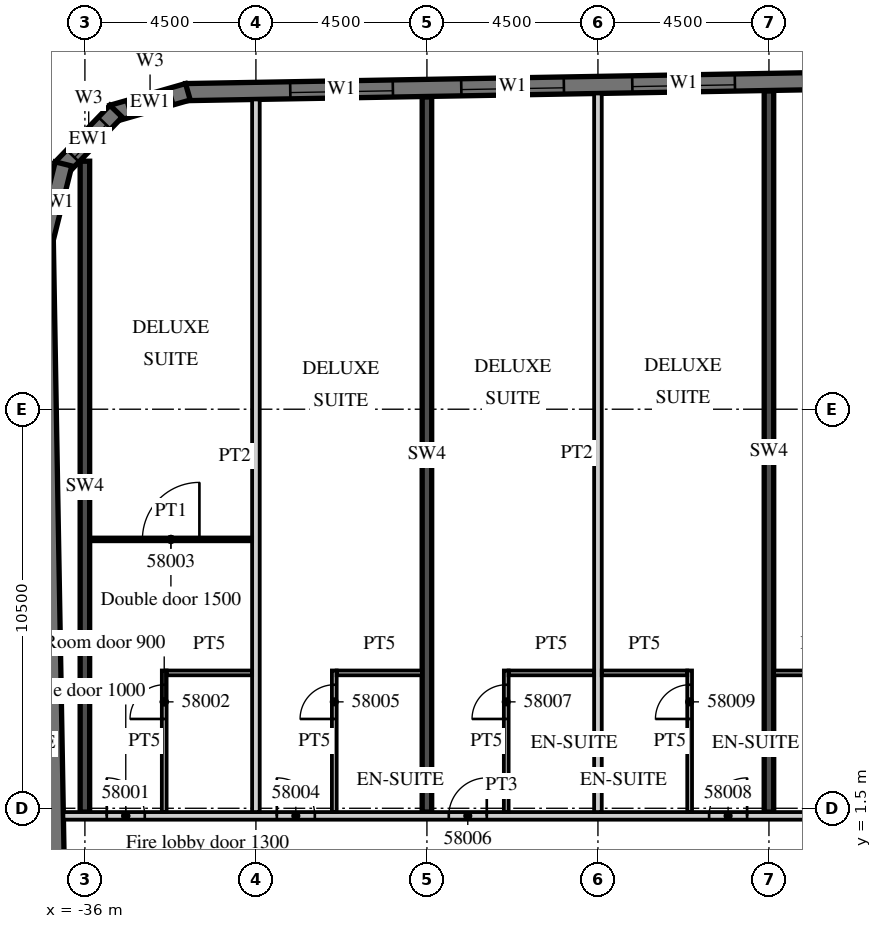
"""IFC4 building model, lengths in metres.
Left out: names, types, materials, properties, quantities, classifications, styles, units other than length and angle.
Written with IfcOpenShell. Run it as: python <this file> out.ifc"""

import sys

from ifc_helpers import new_model, si_unit, direction, frame, frame_2d, origin, place, context, subcontext, project, spatial, polyline, rectangle, outline, extrude, element, fill, save


model = new_model("IFC4")
c1 = context("Model", 3, precision=1e-05, world=origin(), true_north=direction((0.0, 1.0)))
c2 = subcontext(c1, "Body", "Model", "MODEL_VIEW")
j1 = project(units=[si_unit("LENGTHUNIT", "METRE"), si_unit("PLANEANGLEUNIT", "RADIAN")], contexts=[c1])
p1 = place(None, origin())
s1 = spatial("IfcSite", under=j1, at=p1, CompositionType="ELEMENT")
p2 = place(p1, origin())
s2 = spatial("IfcBuilding", under=s1, at=p2, CompositionType="ELEMENT")
p3 = place(p2, frame((0.0, 0.0, 237.5)))
s3 = spatial("IfcBuildingStorey", under=s2, at=p3, CompositionType="ELEMENT", Elevation=237.5)
p4 = place(p3, frame((-36.0, 1.4, 0.0), z_axis=(0.0, 0.0, 1.0), x_axis=(0.0, 1.0, 0.0)))
e1 = element("IfcWall", 1, at=p4, inside=s3, PredefinedType="SHEAR", context=c2, shape_type="SweptSolid", body=[
    extrude(rectangle(XDim=17.125, YDim=0.25, at=frame_2d((8.563, 0.0))), origin(), (0.0, 0.0, 1.0), 3.3),
])
p5 = place(p3, frame((-27.0, 1.4, 0.0), z_axis=(0.0, 0.0, 1.0), x_axis=(0.0, 1.0, 0.0)))
e2 = element("IfcWall", 2, at=p5, inside=s3, PredefinedType="SHEAR", context=c2, shape_type="SweptSolid", body=[
    extrude(rectangle(XDim=18.817, YDim=0.25, at=frame_2d((9.409, 0.0))), origin(), (0.0, 0.0, 1.0), 3.3),
])
p6 = place(p3, frame((-18.0, 1.4, 0.0), z_axis=(0.0, 0.0, 1.0), x_axis=(0.0, 1.0, 0.0)))
e3 = element("IfcWall", 3, at=p6, inside=s3, PredefinedType="SHEAR", context=c2, shape_type="SweptSolid", body=[
    extrude(rectangle(XDim=18.974, YDim=0.25, at=frame_2d((9.487, 0.0))), origin(), (0.0, 0.0, 1.0), 3.3),
])
p7 = place(p3, frame((-37.057, 16.503, 0.0), z_axis=(0.0, 0.0, 1.0), x_axis=(0.017452279857, -0.999847697366, 0.0)))
e4 = element("IfcWall", 4, at=p7, inside=s3, PredefinedType="SOLIDWALL", context=c2, shape_type="SweptSolid", body=[
    extrude(rectangle(XDim=33.0, YDim=0.45, at=frame_2d((16.5, 0.0))), origin(), (0.0, 0.0, 1.0), 3.02),
])
p8 = place(p3, frame((13.504, 21.161, 0.0), z_axis=(0.0, 0.0, 1.0), x_axis=(-0.999847763257, -0.017448504532, 0.0)))
e5 = element("IfcWall", 5, at=p8, inside=s3, PredefinedType="SOLIDWALL", context=c2, shape_type="SweptSolid", body=[
    extrude(rectangle(XDim=46.859, YDim=0.45, at=frame_2d((23.43, 0.0))), origin(), (0.0, 0.0, 1.0), 3.02),
])
p9 = place(p8, frame((0.9, 0.0, 0.45)))
e6 = element("IfcOpeningElement", 6, at=p9, cuts=e5, PredefinedType="OPENING", context=c2, shape_type="SweptSolid", body=[
    extrude(rectangle(XDim=2.7, YDim=2.25, at=frame_2d((1.35, 1.125))), frame((0.0, 0.235, 0.0), z_axis=(0.0, -1.0, 0.0), x_axis=(1.0, 0.0, 0.0)), (0.0, 0.0, 1.0), 0.47),
])
p10 = place(p8, frame((5.401, 0.0, 0.45)))
e7 = element("IfcOpeningElement", 7, at=p10, cuts=e5, PredefinedType="OPENING", context=c2, shape_type="SweptSolid", body=[
    extrude(rectangle(XDim=2.7, YDim=2.25, at=frame_2d((1.35, 1.125))), frame((0.0, 0.235, 0.0), z_axis=(0.0, -1.0, 0.0), x_axis=(1.0, 0.0, 0.0)), (0.0, 0.0, 1.0), 0.47),
])
p11 = place(p8, frame((9.902, 0.0, 0.45)))
e8 = element("IfcOpeningElement", 8, at=p11, cuts=e5, PredefinedType="OPENING", context=c2, shape_type="SweptSolid", body=[
    extrude(rectangle(XDim=2.7, YDim=2.25, at=frame_2d((1.35, 1.125))), frame((0.0, 0.235, 0.0), z_axis=(0.0, -1.0, 0.0), x_axis=(1.0, 0.0, 0.0)), (0.0, 0.0, 1.0), 0.47),
])
p12 = place(p8, frame((14.402, 0.0, 0.45)))
e9 = element("IfcOpeningElement", 9, at=p12, cuts=e5, PredefinedType="OPENING", context=c2, shape_type="SweptSolid", body=[
    extrude(rectangle(XDim=2.7, YDim=2.25, at=frame_2d((1.35, 1.125))), frame((0.0, 0.235, 0.0), z_axis=(0.0, -1.0, 0.0), x_axis=(1.0, 0.0, 0.0)), (0.0, 0.0, 1.0), 0.47),
])
p13 = place(p8, frame((18.903, 0.0, 0.45)))
e10 = element("IfcOpeningElement", 10, at=p13, cuts=e5, PredefinedType="OPENING", context=c2, shape_type="SweptSolid", body=[
    extrude(rectangle(XDim=2.7, YDim=2.25, at=frame_2d((1.35, 1.125))), frame((0.0, 0.235, 0.0), z_axis=(0.0, -1.0, 0.0), x_axis=(1.0, 0.0, 0.0)), (0.0, 0.0, 1.0), 0.47),
])
p14 = place(p8, frame((23.404, 0.0, 0.45)))
e11 = element("IfcOpeningElement", 11, at=p14, cuts=e5, PredefinedType="OPENING", context=c2, shape_type="SweptSolid", body=[
    extrude(rectangle(XDim=2.7, YDim=2.25, at=frame_2d((1.35, 1.125))), frame((0.0, 0.235, 0.0), z_axis=(0.0, -1.0, 0.0), x_axis=(1.0, 0.0, 0.0)), (0.0, 0.0, 1.0), 0.47),
])
p15 = place(p8, frame((27.904, 0.0, 0.45)))
e12 = element("IfcOpeningElement", 12, at=p15, cuts=e5, PredefinedType="OPENING", context=c2, shape_type="SweptSolid", body=[
    extrude(rectangle(XDim=2.7, YDim=2.25, at=frame_2d((1.35, 1.125))), frame((0.0, 0.235, 0.0), z_axis=(0.0, -1.0, 0.0), x_axis=(1.0, 0.0, 0.0)), (0.0, 0.0, 1.0), 0.47),
])
p16 = place(p8, frame((32.405, 0.0, 0.45)))
e13 = element("IfcOpeningElement", 13, at=p16, cuts=e5, PredefinedType="OPENING", context=c2, shape_type="SweptSolid", body=[
    extrude(rectangle(XDim=2.7, YDim=2.25, at=frame_2d((1.35, 1.125))), frame((0.0, 0.235, 0.0), z_axis=(0.0, -1.0, 0.0), x_axis=(1.0, 0.0, 0.0)), (0.0, 0.0, 1.0), 0.47),
])
p17 = place(p8, frame((36.906, 0.0, 0.45)))
e14 = element("IfcOpeningElement", 14, at=p17, cuts=e5, PredefinedType="OPENING", context=c2, shape_type="SweptSolid", body=[
    extrude(rectangle(XDim=2.7, YDim=2.25, at=frame_2d((1.35, 1.125))), frame((0.0, 0.235, 0.0), z_axis=(0.0, -1.0, 0.0), x_axis=(1.0, 0.0, 0.0)), (0.0, 0.0, 1.0), 0.47),
])
p18 = place(p8, frame((41.406, 0.0, 0.45)))
e15 = element("IfcOpeningElement", 15, at=p18, cuts=e5, PredefinedType="OPENING", context=c2, shape_type="SweptSolid", body=[
    extrude(rectangle(XDim=2.7, YDim=2.25, at=frame_2d((1.35, 1.125))), frame((0.0, 0.235, 0.0), z_axis=(0.0, -1.0, 0.0), x_axis=(1.0, 0.0, 0.0)), (0.0, 0.0, 1.0), 0.47),
])
p19 = place(p3, frame((-33.29, 20.352, 0.0), z_axis=(0.0, 0.0, 1.0), x_axis=(-0.961247584925, -0.275686562016, 0.0)))
e16 = element("IfcWall", 16, at=p19, inside=s3, PredefinedType="SOLIDWALL", context=c2, shape_type="SweptSolid", body=[
    extrude(outline(polyline([(0.0, -0.225), (2.071, -0.225), (1.95, 0.225), (0.121, 0.225), (0.0, -0.225)])), origin(), (0.0, 0.0, 1.0), 3.02),
])
p20 = place(p19, frame((0.435, 0.0, 0.45)))
e17 = element("IfcOpeningElement", 17, at=p20, cuts=e16, PredefinedType="OPENING", context=c2, shape_type="SweptSolid", body=[
    extrude(rectangle(XDim=1.2, YDim=2.25, at=frame_2d((0.6, 1.125))), frame((0.0, 0.235, 0.0), z_axis=(0.0, -1.0, 0.0), x_axis=(1.0, 0.0, 0.0)), (0.0, 0.0, 1.0), 0.47),
])
p21 = place(p3, frame((-35.181, 19.842, 0.0), z_axis=(0.0, 0.0, 1.0), x_axis=(-0.694678672846, -0.719320193998, 0.0)))
e18 = element("IfcWall", 18, at=p21, inside=s3, PredefinedType="SOLIDWALL", context=c2, shape_type="SweptSolid", body=[
    extrude(outline(polyline([(0.0, -0.225), (2.071, -0.225), (1.95, 0.225), (0.121, 0.225), (0.0, -0.225)])), origin(), (0.0, 0.0, 1.0), 3.02),
])
p22 = place(p21, frame((0.435, 0.0, 0.45)))
e19 = element("IfcOpeningElement", 19, at=p22, cuts=e18, PredefinedType="OPENING", context=c2, shape_type="SweptSolid", body=[
    extrude(rectangle(XDim=1.2, YDim=2.25, at=frame_2d((0.6, 1.125))), frame((0.0, 0.235, 0.0), z_axis=(0.0, -1.0, 0.0), x_axis=(1.0, 0.0, 0.0)), (0.0, 0.0, 1.0), 0.47),
])
p23 = place(p3, frame((-36.563, 18.454, 0.0), z_axis=(0.0, 0.0, 1.0), x_axis=(-0.241869623482, -0.970308757683, 0.0)))
e20 = element("IfcWall", 20, at=p23, inside=s3, PredefinedType="SOLIDWALL", context=c2, shape_type="SweptSolid", body=[
    extrude(outline(polyline([(-0.0, -0.225), (2.07, -0.225), (1.95, 0.225), (0.12, 0.225), (-0.0, -0.225)])), origin(), (0.0, 0.0, 1.0), 3.02),
])
p24 = place(p3, frame((-36.566, 1.3, 0.0), z_axis=(0.0, 0.0, 1.0), x_axis=(1.0, 0.0, 0.0)))
e21 = element("IfcWall", 21, at=p24, inside=s3, PredefinedType="PARTITIONING", context=c2, shape_type="SweptSolid", body=[
    extrude(rectangle(XDim=23.066, YDim=0.2, at=frame_2d((11.533, 0.0))), origin(), (0.0, 0.0, 1.0), 3.02),
])
p25 = place(p24, frame((1.141, 0.0, 0.0)))
e22 = element("IfcOpeningElement", 22, at=p25, cuts=e21, PredefinedType="OPENING", context=c2, shape_type="SweptSolid", body=[
    extrude(rectangle(XDim=1.0, YDim=2.1, at=frame_2d((0.5, 1.05))), frame((0.0, 0.11, 0.0), z_axis=(0.0, -1.0, 0.0), x_axis=(1.0, 0.0, 0.0)), (0.0, 0.0, 1.0), 0.22),
])
p26 = place(p24, frame((5.616, 0.0, 0.0)))
e23 = element("IfcOpeningElement", 23, at=p26, cuts=e21, PredefinedType="OPENING", context=c2, shape_type="SweptSolid", body=[
    extrude(rectangle(XDim=1.0, YDim=2.1, at=frame_2d((0.5, 1.05))), frame((0.0, 0.11, 0.0), z_axis=(0.0, -1.0, 0.0), x_axis=(1.0, 0.0, 0.0)), (0.0, 0.0, 1.0), 0.22),
])
p27 = place(p24, frame((10.141, 0.0, 0.0)))
e24 = element("IfcOpeningElement", 24, at=p27, cuts=e21, PredefinedType="OPENING", context=c2, shape_type="SweptSolid", body=[
    extrude(rectangle(XDim=1.0, YDim=2.1, at=frame_2d((0.5, 1.05))), frame((0.0, 0.11, 0.0), z_axis=(0.0, -1.0, 0.0), x_axis=(1.0, 0.0, 0.0)), (0.0, 0.0, 1.0), 0.22),
])
p28 = place(p24, frame((16.991, 0.0, 0.0)))
e25 = element("IfcOpeningElement", 25, at=p28, cuts=e21, PredefinedType="OPENING", context=c2, shape_type="SweptSolid", body=[
    extrude(rectangle(XDim=1.0, YDim=2.1, at=frame_2d((0.5, 1.05))), frame((0.0, 0.11, 0.0), z_axis=(0.0, -1.0, 0.0), x_axis=(1.0, 0.0, 0.0)), (0.0, 0.0, 1.0), 0.22),
])
p29 = place(p24, frame((21.491, 0.0, 0.0)))
e26 = element("IfcOpeningElement", 26, at=p29, cuts=e21, PredefinedType="OPENING", context=c2, shape_type="SweptSolid", body=[
    extrude(rectangle(XDim=1.0, YDim=2.1, at=frame_2d((0.5, 1.05))), frame((0.0, 0.11, 0.0), z_axis=(0.0, -1.0, 0.0), x_axis=(1.0, 0.0, 0.0)), (0.0, 0.0, 1.0), 0.22),
])
p30 = place(p3, frame((-31.5, 1.4, 0.0), z_axis=(0.0, 0.0, 1.0), x_axis=(0.0, 1.0, 0.0)))
e27 = element("IfcWall", 27, at=p30, inside=s3, PredefinedType="PARTITIONING", context=c2, shape_type="SweptSolid", body=[
    extrude(rectangle(XDim=18.751, YDim=0.2, at=frame_2d((9.375, 0.0))), origin(), (0.0, 0.0, 1.0), 3.02),
])
p31 = place(p3, frame((-33.913, 1.4, 0.0), z_axis=(0.0, 0.0, 1.0), x_axis=(0.0, 1.0, 0.0)))
e28 = element("IfcWall", 28, at=p31, inside=s3, PredefinedType="PARTITIONING", context=c2, shape_type="SweptSolid", body=[
    extrude(rectangle(XDim=3.725, YDim=0.125, at=frame_2d((1.863, 0.0))), origin(), (0.0, 0.0, 1.0), 3.02),
])
p32 = place(p31, frame((2.45, 0.0, 0.0)))
e29 = element("IfcOpeningElement", 29, at=p32, cuts=e28, PredefinedType="OPENING", context=c2, shape_type="SweptSolid", body=[
    extrude(rectangle(XDim=0.9, YDim=2.1, at=frame_2d((0.45, 1.05))), frame((0.0, 0.073, 0.0), z_axis=(0.0, -1.0, 0.0), x_axis=(1.0, 0.0, 0.0)), (0.0, 0.0, 1.0), 0.145),
])
p33 = place(p3, frame((-33.85, 5.062, 0.0), z_axis=(0.0, 0.0, 1.0), x_axis=(1.0, 0.0, 0.0)))
e30 = element("IfcWall", 30, at=p33, inside=s3, PredefinedType="PARTITIONING", context=c2, shape_type="SweptSolid", body=[
    extrude(rectangle(XDim=2.25, YDim=0.125, at=frame_2d((1.125, 0.0))), origin(), (0.0, 0.0, 1.0), 3.02),
])
p34 = place(p3, frame((-35.875, 8.575, 0.0), z_axis=(0.0, 0.0, 1.0), x_axis=(1.0, 0.0, 0.0)))
e31 = element("IfcWall", 31, at=p34, inside=s3, PredefinedType="PARTITIONING", context=c2, shape_type="SweptSolid", body=[
    extrude(rectangle(XDim=4.275, YDim=0.1, at=frame_2d((2.137, 0.0))), origin(), (0.0, 0.0, 1.0), 3.02),
])
p35 = place(p34, frame((1.388, 0.0, 0.0)))
e32 = element("IfcOpeningElement", 32, at=p35, cuts=e31, PredefinedType="OPENING", context=c2, shape_type="SweptSolid", body=[
    extrude(rectangle(XDim=1.5, YDim=2.1, at=frame_2d((0.75, 1.05))), frame((0.0, 0.06, 0.0), z_axis=(0.0, -1.0, 0.0), x_axis=(1.0, 0.0, 0.0)), (0.0, 0.0, 1.0), 0.12),
])
p36 = place(p3, frame((-29.438, 1.4, 0.0), z_axis=(0.0, 0.0, 1.0), x_axis=(0.0, 1.0, 0.0)))
e33 = element("IfcWall", 33, at=p36, inside=s3, PredefinedType="PARTITIONING", context=c2, shape_type="SweptSolid", body=[
    extrude(rectangle(XDim=3.725, YDim=0.125, at=frame_2d((1.863, 0.0))), origin(), (0.0, 0.0, 1.0), 3.02),
])
p37 = place(p36, frame((2.45, 0.0, 0.0)))
e34 = element("IfcOpeningElement", 34, at=p37, cuts=e33, PredefinedType="OPENING", context=c2, shape_type="SweptSolid", body=[
    extrude(rectangle(XDim=0.9, YDim=2.1, at=frame_2d((0.45, 1.05))), frame((0.0, 0.073, 0.0), z_axis=(0.0, -1.0, 0.0), x_axis=(1.0, 0.0, 0.0)), (0.0, 0.0, 1.0), 0.145),
])
p38 = place(p3, frame((-29.375, 5.062, 0.0), z_axis=(0.0, 0.0, 1.0), x_axis=(1.0, 0.0, 0.0)))
e35 = element("IfcWall", 35, at=p38, inside=s3, PredefinedType="PARTITIONING", context=c2, shape_type="SweptSolid", body=[
    extrude(rectangle(XDim=2.25, YDim=0.125, at=frame_2d((1.125, 0.0))), origin(), (0.0, 0.0, 1.0), 3.02),
])
p39 = place(p3, frame((-22.5, 1.4, 0.0), z_axis=(0.0, 0.0, 1.0), x_axis=(0.0, 1.0, 0.0)))
e36 = element("IfcWall", 36, at=p39, inside=s3, PredefinedType="PARTITIONING", context=c2, shape_type="SweptSolid", body=[
    extrude(rectangle(XDim=18.908, YDim=0.2, at=frame_2d((9.454, 0.0))), origin(), (0.0, 0.0, 1.0), 3.02),
])
p40 = place(p3, frame((-24.913, 1.4, 0.0), z_axis=(0.0, 0.0, 1.0), x_axis=(0.0, 1.0, 0.0)))
e37 = element("IfcWall", 37, at=p40, inside=s3, PredefinedType="PARTITIONING", context=c2, shape_type="SweptSolid", body=[
    extrude(rectangle(XDim=3.725, YDim=0.125, at=frame_2d((1.863, 0.0))), origin(), (0.0, 0.0, 1.0), 3.02),
])
p41 = place(p40, frame((2.45, 0.0, 0.0)))
e38 = element("IfcOpeningElement", 38, at=p41, cuts=e37, PredefinedType="OPENING", context=c2, shape_type="SweptSolid", body=[
    extrude(rectangle(XDim=0.9, YDim=2.1, at=frame_2d((0.45, 1.05))), frame((0.0, 0.073, 0.0), z_axis=(0.0, -1.0, 0.0), x_axis=(1.0, 0.0, 0.0)), (0.0, 0.0, 1.0), 0.145),
])
p42 = place(p3, frame((-24.85, 5.062, 0.0), z_axis=(0.0, 0.0, 1.0), x_axis=(1.0, 0.0, 0.0)))
e39 = element("IfcWall", 39, at=p42, inside=s3, PredefinedType="PARTITIONING", context=c2, shape_type="SweptSolid", body=[
    extrude(rectangle(XDim=2.25, YDim=0.125, at=frame_2d((1.125, 0.0))), origin(), (0.0, 0.0, 1.0), 3.02),
])
p43 = place(p3, frame((-20.087, 1.4, 0.0), z_axis=(0.0, 0.0, 1.0), x_axis=(0.0, 1.0, 0.0)))
e40 = element("IfcWall", 40, at=p43, inside=s3, PredefinedType="PARTITIONING", context=c2, shape_type="SweptSolid", body=[
    extrude(rectangle(XDim=3.725, YDim=0.125, at=frame_2d((1.863, 0.0))), origin(), (0.0, 0.0, 1.0), 3.02),
])
p44 = place(p43, frame((2.45, 0.0, 0.0)))
e41 = element("IfcOpeningElement", 41, at=p44, cuts=e40, PredefinedType="OPENING", context=c2, shape_type="SweptSolid", body=[
    extrude(rectangle(XDim=0.9, YDim=2.1, at=frame_2d((0.45, 1.05))), frame((0.0, 0.073, 0.0), z_axis=(0.0, -1.0, 0.0), x_axis=(1.0, 0.0, 0.0)), (0.0, 0.0, 1.0), 0.145),
])
for number, where, z_axis, x_axis in (
    (42, (-22.4, 5.062, 0.0), (0.0, 0.0, 1.0), (1.0, 0.0, 0.0)),
    (43, (-17.875, 5.062, 0.0), (0.0, 0.0, 1.0), (1.0, 0.0, 0.0)),
):
    element("IfcWall", number, at=place(p3, frame(where, z_axis=z_axis, x_axis=x_axis)), inside=s3, PredefinedType="PARTITIONING", context=c2, shape_type="SweptSolid", body=[
        extrude(rectangle(XDim=2.25, YDim=0.125, at=frame_2d((1.125, 0.0))), origin(), (0.0, 0.0, 1.0), 3.02),
    ])
p45 = place(p16, origin())
e44 = element("IfcWindow", 44, at=p45, inside=s3, PartitioningType="SINGLE_PANEL", PredefinedType="WINDOW", context=c2, shape_type="SweptSolid", body=[
    extrude(rectangle(XDim=2.7, YDim=2.25, at=frame_2d((1.35, 1.125))), frame((0.0, 0.09, 0.0), z_axis=(0.0, -1.0, 0.0), x_axis=(1.0, 0.0, 0.0)), (0.0, 0.0, 1.0), 0.06),
])
fill(e13, e44)
p46 = place(p17, origin())
e45 = element("IfcWindow", 45, at=p46, inside=s3, PartitioningType="SINGLE_PANEL", PredefinedType="WINDOW", context=c2, shape_type="SweptSolid", body=[
    extrude(rectangle(XDim=2.7, YDim=2.25, at=frame_2d((1.35, 1.125))), frame((0.0, 0.09, 0.0), z_axis=(0.0, -1.0, 0.0), x_axis=(1.0, 0.0, 0.0)), (0.0, 0.0, 1.0), 0.06),
])
fill(e14, e45)
p47 = place(p18, origin())
e46 = element("IfcWindow", 46, at=p47, inside=s3, PartitioningType="SINGLE_PANEL", PredefinedType="WINDOW", context=c2, shape_type="SweptSolid", body=[
    extrude(rectangle(XDim=2.7, YDim=2.25, at=frame_2d((1.35, 1.125))), frame((0.0, 0.09, 0.0), z_axis=(0.0, -1.0, 0.0), x_axis=(1.0, 0.0, 0.0)), (0.0, 0.0, 1.0), 0.06),
])
fill(e15, e46)
p48 = place(p20, origin())
e47 = element("IfcWindow", 47, at=p48, inside=s3, PartitioningType="SINGLE_PANEL", PredefinedType="WINDOW", context=c2, shape_type="SweptSolid", body=[
    extrude(rectangle(XDim=1.2, YDim=2.25, at=frame_2d((0.6, 1.125))), frame((0.0, 0.09, 0.0), z_axis=(0.0, -1.0, 0.0), x_axis=(1.0, 0.0, 0.0)), (0.0, 0.0, 1.0), 0.06),
])
fill(e17, e47)
p49 = place(p22, origin())
e48 = element("IfcWindow", 48, at=p49, inside=s3, PartitioningType="SINGLE_PANEL", PredefinedType="WINDOW", context=c2, shape_type="SweptSolid", body=[
    extrude(rectangle(XDim=1.2, YDim=2.25, at=frame_2d((0.6, 1.125))), frame((0.0, 0.09, 0.0), z_axis=(0.0, -1.0, 0.0), x_axis=(1.0, 0.0, 0.0)), (0.0, 0.0, 1.0), 0.06),
])
fill(e19, e48)
p50 = place(p25, origin())
e49 = element("IfcDoor", 49, at=p50, inside=s3, OperationType="SINGLE_SWING_LEFT", PredefinedType="DOOR", context=c2, shape_type="SweptSolid", body=[
    extrude(rectangle(XDim=1.0, YDim=2.1, at=frame_2d((0.5, 1.05))), frame((0.0, 0.025, 0.0), z_axis=(0.0, -1.0, 0.0), x_axis=(1.0, 0.0, 0.0)), (0.0, 0.0, 1.0), 0.05),
])
fill(e22, e49)
p51 = place(p32, origin())
e50 = element("IfcDoor", 50, at=p51, inside=s3, OperationType="SINGLE_SWING_LEFT", PredefinedType="DOOR", context=c2, shape_type="SweptSolid", body=[
    extrude(rectangle(XDim=0.9, YDim=2.1, at=frame_2d((0.45, 1.05))), frame((0.0, 0.025, 0.0), z_axis=(0.0, -1.0, 0.0), x_axis=(1.0, 0.0, 0.0)), (0.0, 0.0, 1.0), 0.05),
])
fill(e29, e50)
p52 = place(p35, origin())
e51 = element("IfcDoor", 51, at=p52, inside=s3, OperationType="SINGLE_SWING_RIGHT", PredefinedType="DOOR", context=c2, shape_type="SweptSolid", body=[
    extrude(rectangle(XDim=1.5, YDim=2.1, at=frame_2d((0.75, 1.05))), frame((0.0, 0.025, 0.0), z_axis=(0.0, -1.0, 0.0), x_axis=(1.0, 0.0, 0.0)), (0.0, 0.0, 1.0), 0.05),
])
fill(e32, e51)
p53 = place(p26, origin())
e52 = element("IfcDoor", 52, at=p53, inside=s3, OperationType="SINGLE_SWING_LEFT", PredefinedType="DOOR", context=c2, shape_type="SweptSolid", body=[
    extrude(rectangle(XDim=1.0, YDim=2.1, at=frame_2d((0.5, 1.05))), frame((0.0, 0.025, 0.0), z_axis=(0.0, -1.0, 0.0), x_axis=(1.0, 0.0, 0.0)), (0.0, 0.0, 1.0), 0.05),
])
fill(e23, e52)
p54 = place(p37, origin())
e53 = element("IfcDoor", 53, at=p54, inside=s3, OperationType="SINGLE_SWING_LEFT", PredefinedType="DOOR", context=c2, shape_type="SweptSolid", body=[
    extrude(rectangle(XDim=0.9, YDim=2.1, at=frame_2d((0.45, 1.05))), frame((0.0, 0.025, 0.0), z_axis=(0.0, -1.0, 0.0), x_axis=(1.0, 0.0, 0.0)), (0.0, 0.0, 1.0), 0.05),
])
fill(e34, e53)
p55 = place(p27, origin())
e54 = element("IfcDoor", 54, at=p55, inside=s3, OperationType="SINGLE_SWING_RIGHT", PredefinedType="DOOR", context=c2, shape_type="SweptSolid", body=[
    extrude(rectangle(XDim=1.0, YDim=2.1, at=frame_2d((0.5, 1.05))), frame((0.0, 0.025, 0.0), z_axis=(0.0, -1.0, 0.0), x_axis=(1.0, 0.0, 0.0)), (0.0, 0.0, 1.0), 0.05),
])
fill(e24, e54)
p56 = place(p41, origin())
e55 = element("IfcDoor", 55, at=p56, inside=s3, OperationType="SINGLE_SWING_LEFT", PredefinedType="DOOR", context=c2, shape_type="SweptSolid", body=[
    extrude(rectangle(XDim=0.9, YDim=2.1, at=frame_2d((0.45, 1.05))), frame((0.0, 0.025, 0.0), z_axis=(0.0, -1.0, 0.0), x_axis=(1.0, 0.0, 0.0)), (0.0, 0.0, 1.0), 0.05),
])
fill(e38, e55)
p57 = place(p28, origin())
e56 = element("IfcDoor", 56, at=p57, inside=s3, OperationType="SINGLE_SWING_RIGHT", PredefinedType="DOOR", context=c2, shape_type="SweptSolid", body=[
    extrude(rectangle(XDim=1.0, YDim=2.1, at=frame_2d((0.5, 1.05))), frame((0.0, 0.025, 0.0), z_axis=(0.0, -1.0, 0.0), x_axis=(1.0, 0.0, 0.0)), (0.0, 0.0, 1.0), 0.05),
])
fill(e25, e56)
p58 = place(p44, origin())
e57 = element("IfcDoor", 57, at=p58, inside=s3, OperationType="SINGLE_SWING_LEFT", PredefinedType="DOOR", context=c2, shape_type="SweptSolid", body=[
    extrude(rectangle(XDim=0.9, YDim=2.1, at=frame_2d((0.45, 1.05))), frame((0.0, 0.025, 0.0), z_axis=(0.0, -1.0, 0.0), x_axis=(1.0, 0.0, 0.0)), (0.0, 0.0, 1.0), 0.05),
])
fill(e41, e57)
save(model, sys.argv[1])
